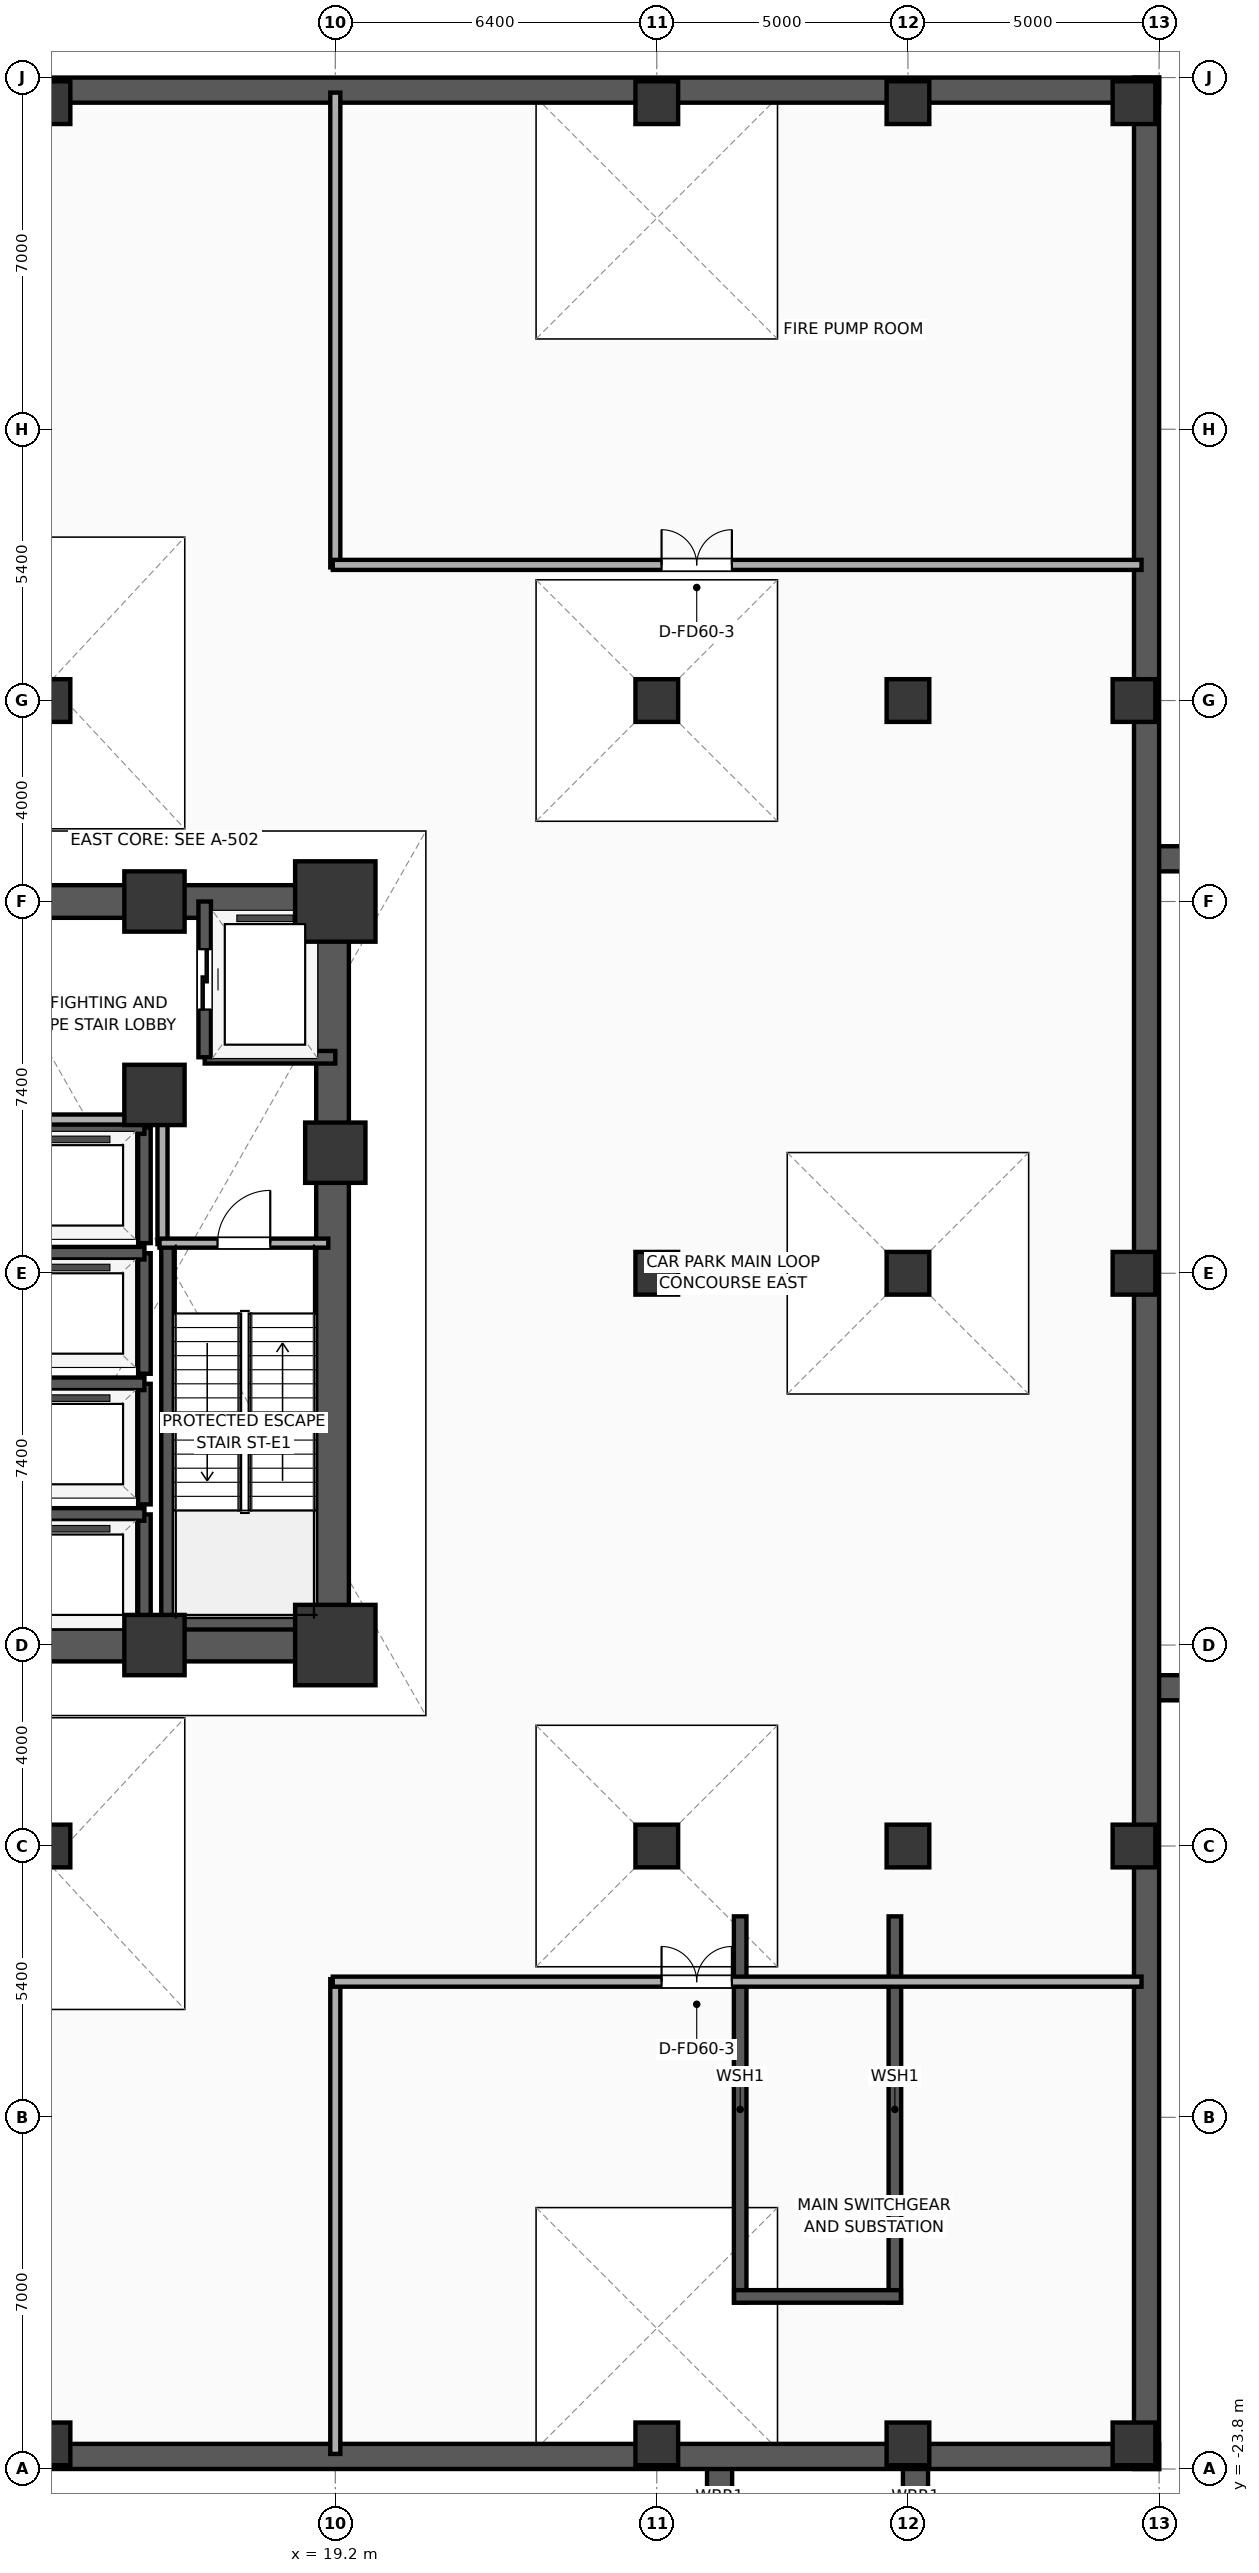
"""IFC4 building model, lengths in metres.
Left out: names, types, materials, properties, quantities, classifications, styles, units other than length and angle.
Written with IfcOpenShell. Run it as: python <this file> out.ifc"""

import sys

from ifc_helpers import new_model, si_unit, direction, frame, frame_2d, origin, origin_2d, place, context, subcontext, project, spatial, rectangle, extrude, element, fill, save


model = new_model("IFC4")
c1 = context("Model", 3, precision=1e-05, world=origin(), true_north=direction((0.0, 1.0)))
c2 = subcontext(c1, "Body", "Model", "MODEL_VIEW")
j1 = project(units=[si_unit("LENGTHUNIT", "METRE"), si_unit("PLANEANGLEUNIT", "RADIAN")], contexts=[c1])
p1 = place(None, origin())
s1 = spatial("IfcSite", under=j1, at=p1, CompositionType="ELEMENT")
p2 = place(p1, origin())
s2 = spatial("IfcBuilding", under=s1, at=p2, CompositionType="ELEMENT")
p3 = place(p2, frame((0.0, 0.0, -10.4)))
s3 = spatial("IfcBuildingStorey", under=s2, at=p3, CompositionType="ELEMENT", Elevation=-10.4)
for number, where, z_axis, x_axis in (
    (1, (26.85, -26.95, 0.0), (0.0, 0.0, 1.0), (0.0, 1.0, 0.0)),
    (2, (30.75, -26.95, 0.0), (0.0, 0.0, 1.0), (0.0, 1.0, 0.0)),
):
    element("IfcWall", number, at=place(p3, frame(where, z_axis=z_axis, x_axis=x_axis)), inside=s3, PredefinedType="USERDEFINED", context=c2, shape_type="SweptSolid", body=[
        extrude(rectangle(XDim=3.4, YDim=0.5, at=frame_2d((1.7, 0.0))), origin(), (0.0, 0.0, 1.0), 5.2),
    ])
for number, where, z_axis, x_axis in (
    (3, (35.35, -8.25, 0.0), (0.0, 0.0, 1.0), (1.0, 0.0, 0.0)),
    (4, (35.35, 8.25, 0.0), (0.0, 0.0, 1.0), (1.0, 0.0, 0.0)),
):
    element("IfcWall", number, at=place(p3, frame(where, z_axis=z_axis, x_axis=x_axis)), inside=s3, PredefinedType="USERDEFINED", context=c2, shape_type="SweptSolid", body=[
        extrude(rectangle(XDim=6.0, YDim=0.5, at=frame_2d((3.0, 0.0))), origin(), (0.0, 0.0, 1.0), 5.2),
    ])
for number, where, z_axis, x_axis in (
    (5, (15.6, 3.55, 0.0), (0.0, 0.0, 1.0), (1.0, 0.0, 0.0)),
    (6, (15.6, -7.4, 0.0), (0.0, 0.0, 1.0), (1.0, 0.0, 0.0)),
    (7, (15.6, 7.4, 0.0), (0.0, 0.0, 1.0), (1.0, 0.0, 0.0)),
):
    element("IfcColumn", number, at=place(p3, frame(where, z_axis=z_axis, x_axis=x_axis)), inside=s3, PredefinedType="COLUMN", context=c2, shape_type="SweptSolid", body=[
        extrude(rectangle(XDim=1.2, YDim=1.2, at=origin_2d()), origin(), (0.0, 0.0, 1.0), 5.2),
    ])
p4 = place(p3, frame((19.2, -7.4, 0.0), z_axis=(0.0, 0.0, 1.0), x_axis=(1.0, 0.0, 0.0)))
e8 = element("IfcColumn", 8, at=p4, inside=s3, PredefinedType="COLUMN", context=c2, shape_type="SweptSolid", body=[
    extrude(rectangle(XDim=1.6, YDim=1.6, at=origin_2d()), origin(), (0.0, 0.0, 1.0), 5.2),
])
p5 = place(p3, frame((19.2, 2.4, 0.0), z_axis=(0.0, 0.0, 1.0), x_axis=(1.0, 0.0, 0.0)))
e9 = element("IfcColumn", 9, at=p5, inside=s3, PredefinedType="COLUMN", context=c2, shape_type="SweptSolid", body=[
    extrude(rectangle(XDim=1.2, YDim=1.2, at=origin_2d()), origin(), (0.0, 0.0, 1.0), 5.2),
])
p6 = place(p3, frame((19.2, 7.4, 0.0), z_axis=(0.0, 0.0, 1.0), x_axis=(1.0, 0.0, 0.0)))
e10 = element("IfcColumn", 10, at=p6, inside=s3, PredefinedType="COLUMN", context=c2, shape_type="SweptSolid", body=[
    extrude(rectangle(XDim=1.6, YDim=1.6, at=origin_2d()), origin(), (0.0, 0.0, 1.0), 5.2),
])
for number, where, z_axis, x_axis in (
    (11, (12.075, -7.4, 0.0), (0.0, 0.0, 1.0), (1.0, 0.0, 0.0)),
    (12, (12.075, 7.4, 0.0), (0.0, 0.0, 1.0), (1.0, 0.0, 0.0)),
):
    element("IfcWall", number, at=place(p3, frame(where, z_axis=z_axis, x_axis=x_axis)), inside=s3, PredefinedType="SHEAR", context=c2, shape_type="SweptSolid", body=[
        extrude(rectangle(XDim=7.45, YDim=0.65, at=frame_2d((3.725, 0.0))), origin(), (0.0, 0.0, 1.0), 4.88),
    ])
p7 = place(p3, frame((19.145, -7.4, 0.0), z_axis=(0.0, 0.0, 1.0), x_axis=(0.0, 1.0, 0.0)))
e13 = element("IfcWall", 13, at=p7, inside=s3, PredefinedType="SHEAR", context=c2, shape_type="SweptSolid", body=[
    extrude(rectangle(XDim=14.8, YDim=0.65, at=frame_2d((7.4, 0.0))), origin(), (0.0, 0.0, 1.0), 4.88),
])
p8 = place(p3, frame((15.86, -7.085, 0.0), z_axis=(0.0, 0.0, 1.0), x_axis=(0.0, 1.0, 0.0)))
e14 = element("IfcWall", 14, at=p8, inside=s3, PredefinedType="SOLIDWALL", context=c2, shape_type="SweptSolid", body=[
    extrude(rectangle(XDim=7.685, YDim=0.25, at=frame_2d((3.843, 0.0))), origin(), (0.0, 0.0, 1.0), 4.88),
])
p9 = place(p3, frame((15.74, -6.965, 0.0), z_axis=(0.0, 0.0, 1.0), x_axis=(1.0, 0.0, 0.0)))
e15 = element("IfcWall", 15, at=p9, inside=s3, PredefinedType="SOLIDWALL", context=c2, shape_type="SweptSolid", body=[
    extrude(rectangle(XDim=3.46, YDim=0.25, at=frame_2d((1.73, 0.0))), origin(), (0.0, 0.0, 1.0), 4.88),
])
for number, where, z_axis, x_axis in (
    (16, (27.26, -20.485, 0.0), (0.0, 0.0, 1.0), (0.0, 1.0, 0.0)),
    (17, (30.34, -20.485, 0.0), (0.0, 0.0, 1.0), (0.0, 1.0, 0.0)),
):
    element("IfcWall", number, at=place(p3, frame(where, z_axis=z_axis, x_axis=x_axis)), inside=s3, PredefinedType="SOLIDWALL", context=c2, shape_type="SweptSolid", body=[
        extrude(rectangle(XDim=7.685, YDim=0.25, at=frame_2d((3.843, 0.0))), origin(), (0.0, 0.0, 1.0), 4.88),
    ])
p10 = place(p3, frame((27.14, -20.365, 0.0), z_axis=(0.0, 0.0, 1.0), x_axis=(1.0, 0.0, 0.0)))
e18 = element("IfcWall", 18, at=p10, inside=s3, PredefinedType="SOLIDWALL", context=c2, shape_type="SweptSolid", body=[
    extrude(rectangle(XDim=3.32, YDim=0.25, at=frame_2d((1.66, 0.0))), origin(), (0.0, 0.0, 1.0), 4.88),
])
for number, where, z_axis, x_axis in (
    (19, (-38.4, -23.55, 0.0), (0.0, 0.0, 1.0), (1.0, 0.0, 0.0)),
    (20, (-38.4, 23.55, 0.0), (0.0, 0.0, 1.0), (1.0, 0.0, 0.0)),
):
    element("IfcWall", number, at=place(p3, frame(where, z_axis=z_axis, x_axis=x_axis)), inside=s3, PredefinedType="USERDEFINED", context=c2, shape_type="SweptSolid", body=[
        extrude(rectangle(XDim=74.0, YDim=0.5, at=frame_2d((37.0, 0.0))), origin(), (0.0, 0.0, 1.0), 4.88),
    ])
p11 = place(p3, frame((35.35, -23.8, 0.0), z_axis=(0.0, 0.0, 1.0), x_axis=(0.0, 1.0, 0.0)))
e21 = element("IfcWall", 21, at=p11, inside=s3, PredefinedType="USERDEFINED", context=c2, shape_type="SweptSolid", body=[
    extrude(rectangle(XDim=47.6, YDim=0.5, at=frame_2d((23.8, 0.0))), origin(), (0.0, 0.0, 1.0), 4.88),
])
for number, where, z_axis, x_axis in (
    (22, (13.5, -23.3, 0.0), (0.0, 0.0, 1.0), (1.0, 0.0, 0.0)),
    (23, (13.5, -11.4, 0.0), (0.0, 0.0, 1.0), (1.0, 0.0, 0.0)),
    (24, (13.5, 11.4, 0.0), (0.0, 0.0, 1.0), (1.0, 0.0, 0.0)),
    (25, (13.5, 23.3, 0.0), (0.0, 0.0, 1.0), (1.0, 0.0, 0.0)),
    (26, (25.6, -23.3, 0.0), (0.0, 0.0, 1.0), (1.0, 0.0, 0.0)),
    (27, (25.6, -11.4, 0.0), (0.0, 0.0, 1.0), (1.0, 0.0, 0.0)),
    (28, (25.6, 0.0, 0.0), (0.0, 0.0, 1.0), (1.0, 0.0, 0.0)),
    (29, (25.6, 11.4, 0.0), (0.0, 0.0, 1.0), (1.0, 0.0, 0.0)),
    (30, (25.6, 23.3, 0.0), (0.0, 0.0, 1.0), (1.0, 0.0, 0.0)),
    (31, (30.6, -23.3, 0.0), (0.0, 0.0, 1.0), (1.0, 0.0, 0.0)),
    (32, (30.6, -11.4, 0.0), (0.0, 0.0, 1.0), (1.0, 0.0, 0.0)),
    (33, (30.6, 0.0, 0.0), (0.0, 0.0, 1.0), (1.0, 0.0, 0.0)),
    (34, (30.6, 11.4, 0.0), (0.0, 0.0, 1.0), (1.0, 0.0, 0.0)),
    (35, (30.6, 23.3, 0.0), (0.0, 0.0, 1.0), (1.0, 0.0, 0.0)),
    (36, (35.1, -23.3, 0.0), (0.0, 0.0, 1.0), (1.0, 0.0, 0.0)),
    (37, (35.1, -11.4, 0.0), (0.0, 0.0, 1.0), (1.0, 0.0, 0.0)),
    (38, (35.1, 0.0, 0.0), (0.0, 0.0, 1.0), (1.0, 0.0, 0.0)),
    (39, (35.1, 11.4, 0.0), (0.0, 0.0, 1.0), (1.0, 0.0, 0.0)),
    (40, (35.1, 23.3, 0.0), (0.0, 0.0, 1.0), (1.0, 0.0, 0.0)),
):
    element("IfcColumn", number, at=place(p3, frame(where, z_axis=z_axis, x_axis=x_axis)), inside=s3, PredefinedType="COLUMN", context=c2, shape_type="SweptSolid", body=[
        extrude(rectangle(XDim=0.85, YDim=0.85, at=origin_2d()), origin(), (0.0, 0.0, 1.0), 5.2),
    ])
p12 = place(p3, frame((16.6, 4.3, 0.0), z_axis=(0.0, 0.0, 1.0), x_axis=(1.0, 0.0, 0.0)))
e41 = element("IfcWall", 41, at=p12, inside=s3, PredefinedType="SOLIDWALL", context=c2, shape_type="SweptSolid", body=[
    extrude(rectangle(XDim=2.6, YDim=0.25, at=frame_2d((1.3, 0.0))), origin(), (0.0, 0.0, 1.0), 4.88),
])
p13 = place(p3, frame((16.6, 7.4, 0.0), z_axis=(0.0, 0.0, 1.0), x_axis=(0.0, -1.0, 0.0)))
e42 = element("IfcWall", 42, at=p13, inside=s3, PredefinedType="SOLIDWALL", context=c2, shape_type="SweptSolid", body=[
    extrude(rectangle(XDim=3.1, YDim=0.25, at=frame_2d((1.55, 0.0))), origin(), (0.0, 0.0, 1.0), 4.88),
])
p14 = place(p13, frame((0.95, 0.0, 0.0)))
e43 = element("IfcOpeningElement", 43, at=p14, cuts=e42, PredefinedType="OPENING", context=c2, shape_type="SweptSolid", body=[
    extrude(rectangle(XDim=1.2, YDim=2.05, at=frame_2d((0.6, 1.025))), frame((0.0, 0.135, 0.0), z_axis=(0.0, -1.0, 0.0), x_axis=(1.0, 0.0, 0.0)), (0.0, 0.0, 1.0), 0.27),
])
p15 = place(p3, frame((15.4, -7.4, 0.0), z_axis=(0.0, 0.0, 1.0), x_axis=(0.0, 1.0, 0.0)))
e44 = element("IfcWall", 44, at=p15, inside=s3, PredefinedType="SOLIDWALL", context=c2, shape_type="SweptSolid", body=[
    extrude(rectangle(XDim=2.6, YDim=0.25, at=frame_2d((1.3, 0.0))), origin(), (0.0, 0.0, 1.0), 4.88),
])
p16 = place(p3, frame((15.4, -4.8, 0.0), z_axis=(0.0, 0.0, 1.0), x_axis=(-1.0, 0.0, 0.0)))
e45 = element("IfcWall", 45, at=p16, inside=s3, PredefinedType="SOLIDWALL", context=c2, shape_type="SweptSolid", body=[
    extrude(rectangle(XDim=3.0, YDim=0.25, at=frame_2d((1.5, 0.0))), origin(), (0.0, 0.0, 1.0), 4.88),
])
p17 = place(p3, frame((15.4, -4.6, 0.0), z_axis=(0.0, 0.0, 1.0), x_axis=(0.0, 1.0, 0.0)))
e46 = element("IfcWall", 46, at=p17, inside=s3, PredefinedType="SOLIDWALL", context=c2, shape_type="SweptSolid", body=[
    extrude(rectangle(XDim=2.4, YDim=0.25, at=frame_2d((1.2, 0.0))), origin(), (0.0, 0.0, 1.0), 4.88),
])
p18 = place(p3, frame((15.4, -2.2, 0.0), z_axis=(0.0, 0.0, 1.0), x_axis=(-1.0, 0.0, 0.0)))
e47 = element("IfcWall", 47, at=p18, inside=s3, PredefinedType="SOLIDWALL", context=c2, shape_type="SweptSolid", body=[
    extrude(rectangle(XDim=3.0, YDim=0.25, at=frame_2d((1.5, 0.0))), origin(), (0.0, 0.0, 1.0), 4.88),
])
p19 = place(p3, frame((15.4, -2.0, 0.0), z_axis=(0.0, 0.0, 1.0), x_axis=(0.0, 1.0, 0.0)))
e48 = element("IfcWall", 48, at=p19, inside=s3, PredefinedType="SOLIDWALL", context=c2, shape_type="SweptSolid", body=[
    extrude(rectangle(XDim=2.4, YDim=0.25, at=frame_2d((1.2, 0.0))), origin(), (0.0, 0.0, 1.0), 4.88),
])
p20 = place(p3, frame((15.4, 0.4, 0.0), z_axis=(0.0, 0.0, 1.0), x_axis=(-1.0, 0.0, 0.0)))
e49 = element("IfcWall", 49, at=p20, inside=s3, PredefinedType="SOLIDWALL", context=c2, shape_type="SweptSolid", body=[
    extrude(rectangle(XDim=3.0, YDim=0.25, at=frame_2d((1.5, 0.0))), origin(), (0.0, 0.0, 1.0), 4.88),
])
p21 = place(p3, frame((15.4, 0.6, 0.0), z_axis=(0.0, 0.0, 1.0), x_axis=(0.0, 1.0, 0.0)))
e50 = element("IfcWall", 50, at=p21, inside=s3, PredefinedType="SOLIDWALL", context=c2, shape_type="SweptSolid", body=[
    extrude(rectangle(XDim=2.3, YDim=0.25, at=frame_2d((1.15, 0.0))), origin(), (0.0, 0.0, 1.0), 4.88),
])
p22 = place(p3, frame((15.4, 2.9, 0.0), z_axis=(0.0, 0.0, 1.0), x_axis=(-1.0, 0.0, 0.0)))
e51 = element("IfcWall", 51, at=p22, inside=s3, PredefinedType="SOLIDWALL", context=c2, shape_type="SweptSolid", body=[
    extrude(rectangle(XDim=3.0, YDim=0.25, at=frame_2d((1.5, 0.0))), origin(), (0.0, 0.0, 1.0), 4.88),
])
p23 = place(p3, frame((15.76, 0.58, 0.0), z_axis=(0.0, 0.0, 1.0), x_axis=(0.0, 1.0, 0.0)))
e52 = element("IfcWall", 52, at=p23, inside=s3, PredefinedType="PARTITIONING", context=c2, shape_type="SweptSolid", body=[
    extrude(rectangle(XDim=2.52, YDim=0.2, at=frame_2d((1.26, 0.0))), origin(), (0.0, 0.0, 1.0), 4.88),
])
p24 = place(p3, frame((12.66, 3.06, 0.0), z_axis=(0.0, 0.0, 1.0), x_axis=(1.0, 0.0, 0.0)))
e53 = element("IfcWall", 53, at=p24, inside=s3, PredefinedType="PARTITIONING", context=c2, shape_type="SweptSolid", body=[
    extrude(rectangle(XDim=3.16, YDim=0.2, at=frame_2d((1.58, 0.0))), origin(), (0.0, 0.0, 1.0), 4.88),
])
p25 = place(p3, frame((15.7, 0.6, 0.0), z_axis=(0.0, 0.0, 1.0), x_axis=(1.0, 0.0, 0.0)))
e54 = element("IfcWall", 54, at=p25, inside=s3, PredefinedType="PARTITIONING", context=c2, shape_type="SweptSolid", body=[
    extrude(rectangle(XDim=3.36, YDim=0.18, at=frame_2d((1.68, 0.0))), origin(), (0.0, 0.0, 1.0), 4.88),
])
p26 = place(p25, frame((1.155, 0.0, 0.0)))
e55 = element("IfcOpeningElement", 55, at=p26, cuts=e54, PredefinedType="OPENING", context=c2, shape_type="SweptSolid", body=[
    extrude(rectangle(XDim=1.05, YDim=2.05, at=frame_2d((0.525, 1.025))), frame((0.0, 0.1, 0.0), z_axis=(0.0, -1.0, 0.0), x_axis=(1.0, 0.0, 0.0)), (0.0, 0.0, 1.0), 0.2),
])
for number, where, z_axis, x_axis in (
    (56, (19.2, -23.5, 0.0), (0.0, 0.0, 1.0), (0.0, 1.0, 0.0)),
    (57, (19.2, 14.05, 0.0), (0.0, 0.0, 1.0), (0.0, 1.0, 0.0)),
):
    element("IfcWall", number, at=place(p3, frame(where, z_axis=z_axis, x_axis=x_axis)), inside=s3, PredefinedType="PARTITIONING", context=c2, shape_type="SweptSolid", body=[
        extrude(rectangle(XDim=9.45, YDim=0.2, at=frame_2d((4.725, 0.0))), origin(), (0.0, 0.0, 1.0), 4.88),
    ])
p27 = place(p3, frame((19.15, -14.1, 0.0), z_axis=(0.0, 0.0, 1.0), x_axis=(1.0, 0.0, 0.0)))
e58 = element("IfcWall", 58, at=p27, inside=s3, PredefinedType="PARTITIONING", context=c2, shape_type="SweptSolid", body=[
    extrude(rectangle(XDim=16.1, YDim=0.2, at=frame_2d((8.05, 0.0))), origin(), (0.0, 0.0, 1.0), 4.88),
])
p28 = place(p27, frame((6.545, 0.0, 0.0)))
e59 = element("IfcOpeningElement", 59, at=p28, cuts=e58, PredefinedType="OPENING", context=c2, shape_type="SweptSolid", body=[
    extrude(rectangle(XDim=1.4, YDim=2.05, at=frame_2d((0.7, 1.025))), frame((0.0, 0.11, 0.0), z_axis=(0.0, -1.0, 0.0), x_axis=(1.0, 0.0, 0.0)), (0.0, 0.0, 1.0), 0.22),
])
p29 = place(p3, frame((19.15, 14.1, 0.0), z_axis=(0.0, 0.0, 1.0), x_axis=(1.0, 0.0, 0.0)))
e60 = element("IfcWall", 60, at=p29, inside=s3, PredefinedType="PARTITIONING", context=c2, shape_type="SweptSolid", body=[
    extrude(rectangle(XDim=16.1, YDim=0.2, at=frame_2d((8.05, 0.0))), origin(), (0.0, 0.0, 1.0), 4.88),
])
p30 = place(p29, frame((6.545, 0.0, 0.0)))
e61 = element("IfcOpeningElement", 61, at=p30, cuts=e60, PredefinedType="OPENING", context=c2, shape_type="SweptSolid", body=[
    extrude(rectangle(XDim=1.4, YDim=2.05, at=frame_2d((0.7, 1.025))), frame((0.0, 0.11, 0.0), z_axis=(0.0, -1.0, 0.0), x_axis=(1.0, 0.0, 0.0)), (0.0, 0.0, 1.0), 0.22),
])
p31 = place(p14, origin())
e62 = element("IfcDoor", 62, at=p31, inside=s3, OperationType="SLIDING_TO_LEFT", PredefinedType="DOOR", context=c2, shape_type="SweptSolid", body=[
    extrude(rectangle(XDim=1.2, YDim=2.05, at=frame_2d((0.6, 1.025))), frame((0.0, 0.025, 0.0), z_axis=(0.0, -1.0, 0.0), x_axis=(1.0, 0.0, 0.0)), (0.0, 0.0, 1.0), 0.05),
])
fill(e43, e62)
p32 = place(p26, origin())
e63 = element("IfcDoor", 63, at=p32, inside=s3, OperationType="SINGLE_SWING_RIGHT", PredefinedType="DOOR", context=c2, shape_type="SweptSolid", body=[
    extrude(rectangle(XDim=1.05, YDim=2.05, at=frame_2d((0.525, 1.025))), frame((0.0, 0.025, 0.0), z_axis=(0.0, -1.0, 0.0), x_axis=(1.0, 0.0, 0.0)), (0.0, 0.0, 1.0), 0.05),
])
fill(e55, e63)
p33 = place(p28, origin())
e64 = element("IfcDoor", 64, at=p33, inside=s3, OperationType="DOUBLE_DOOR_SINGLE_SWING", PredefinedType="DOOR", context=c2, shape_type="SweptSolid", body=[
    extrude(rectangle(XDim=1.4, YDim=2.05, at=frame_2d((0.7, 1.025))), frame((0.0, 0.025, 0.0), z_axis=(0.0, -1.0, 0.0), x_axis=(1.0, 0.0, 0.0)), (0.0, 0.0, 1.0), 0.05),
])
fill(e59, e64)
p34 = place(p30, origin())
e65 = element("IfcDoor", 65, at=p34, inside=s3, OperationType="DOUBLE_DOOR_SINGLE_SWING", PredefinedType="DOOR", context=c2, shape_type="SweptSolid", body=[
    extrude(rectangle(XDim=1.4, YDim=2.05, at=frame_2d((0.7, 1.025))), frame((0.0, 0.025, 0.0), z_axis=(0.0, -1.0, 0.0), x_axis=(1.0, 0.0, 0.0)), (0.0, 0.0, 1.0), 0.05),
])
fill(e61, e65)
save(model, sys.argv[1])
